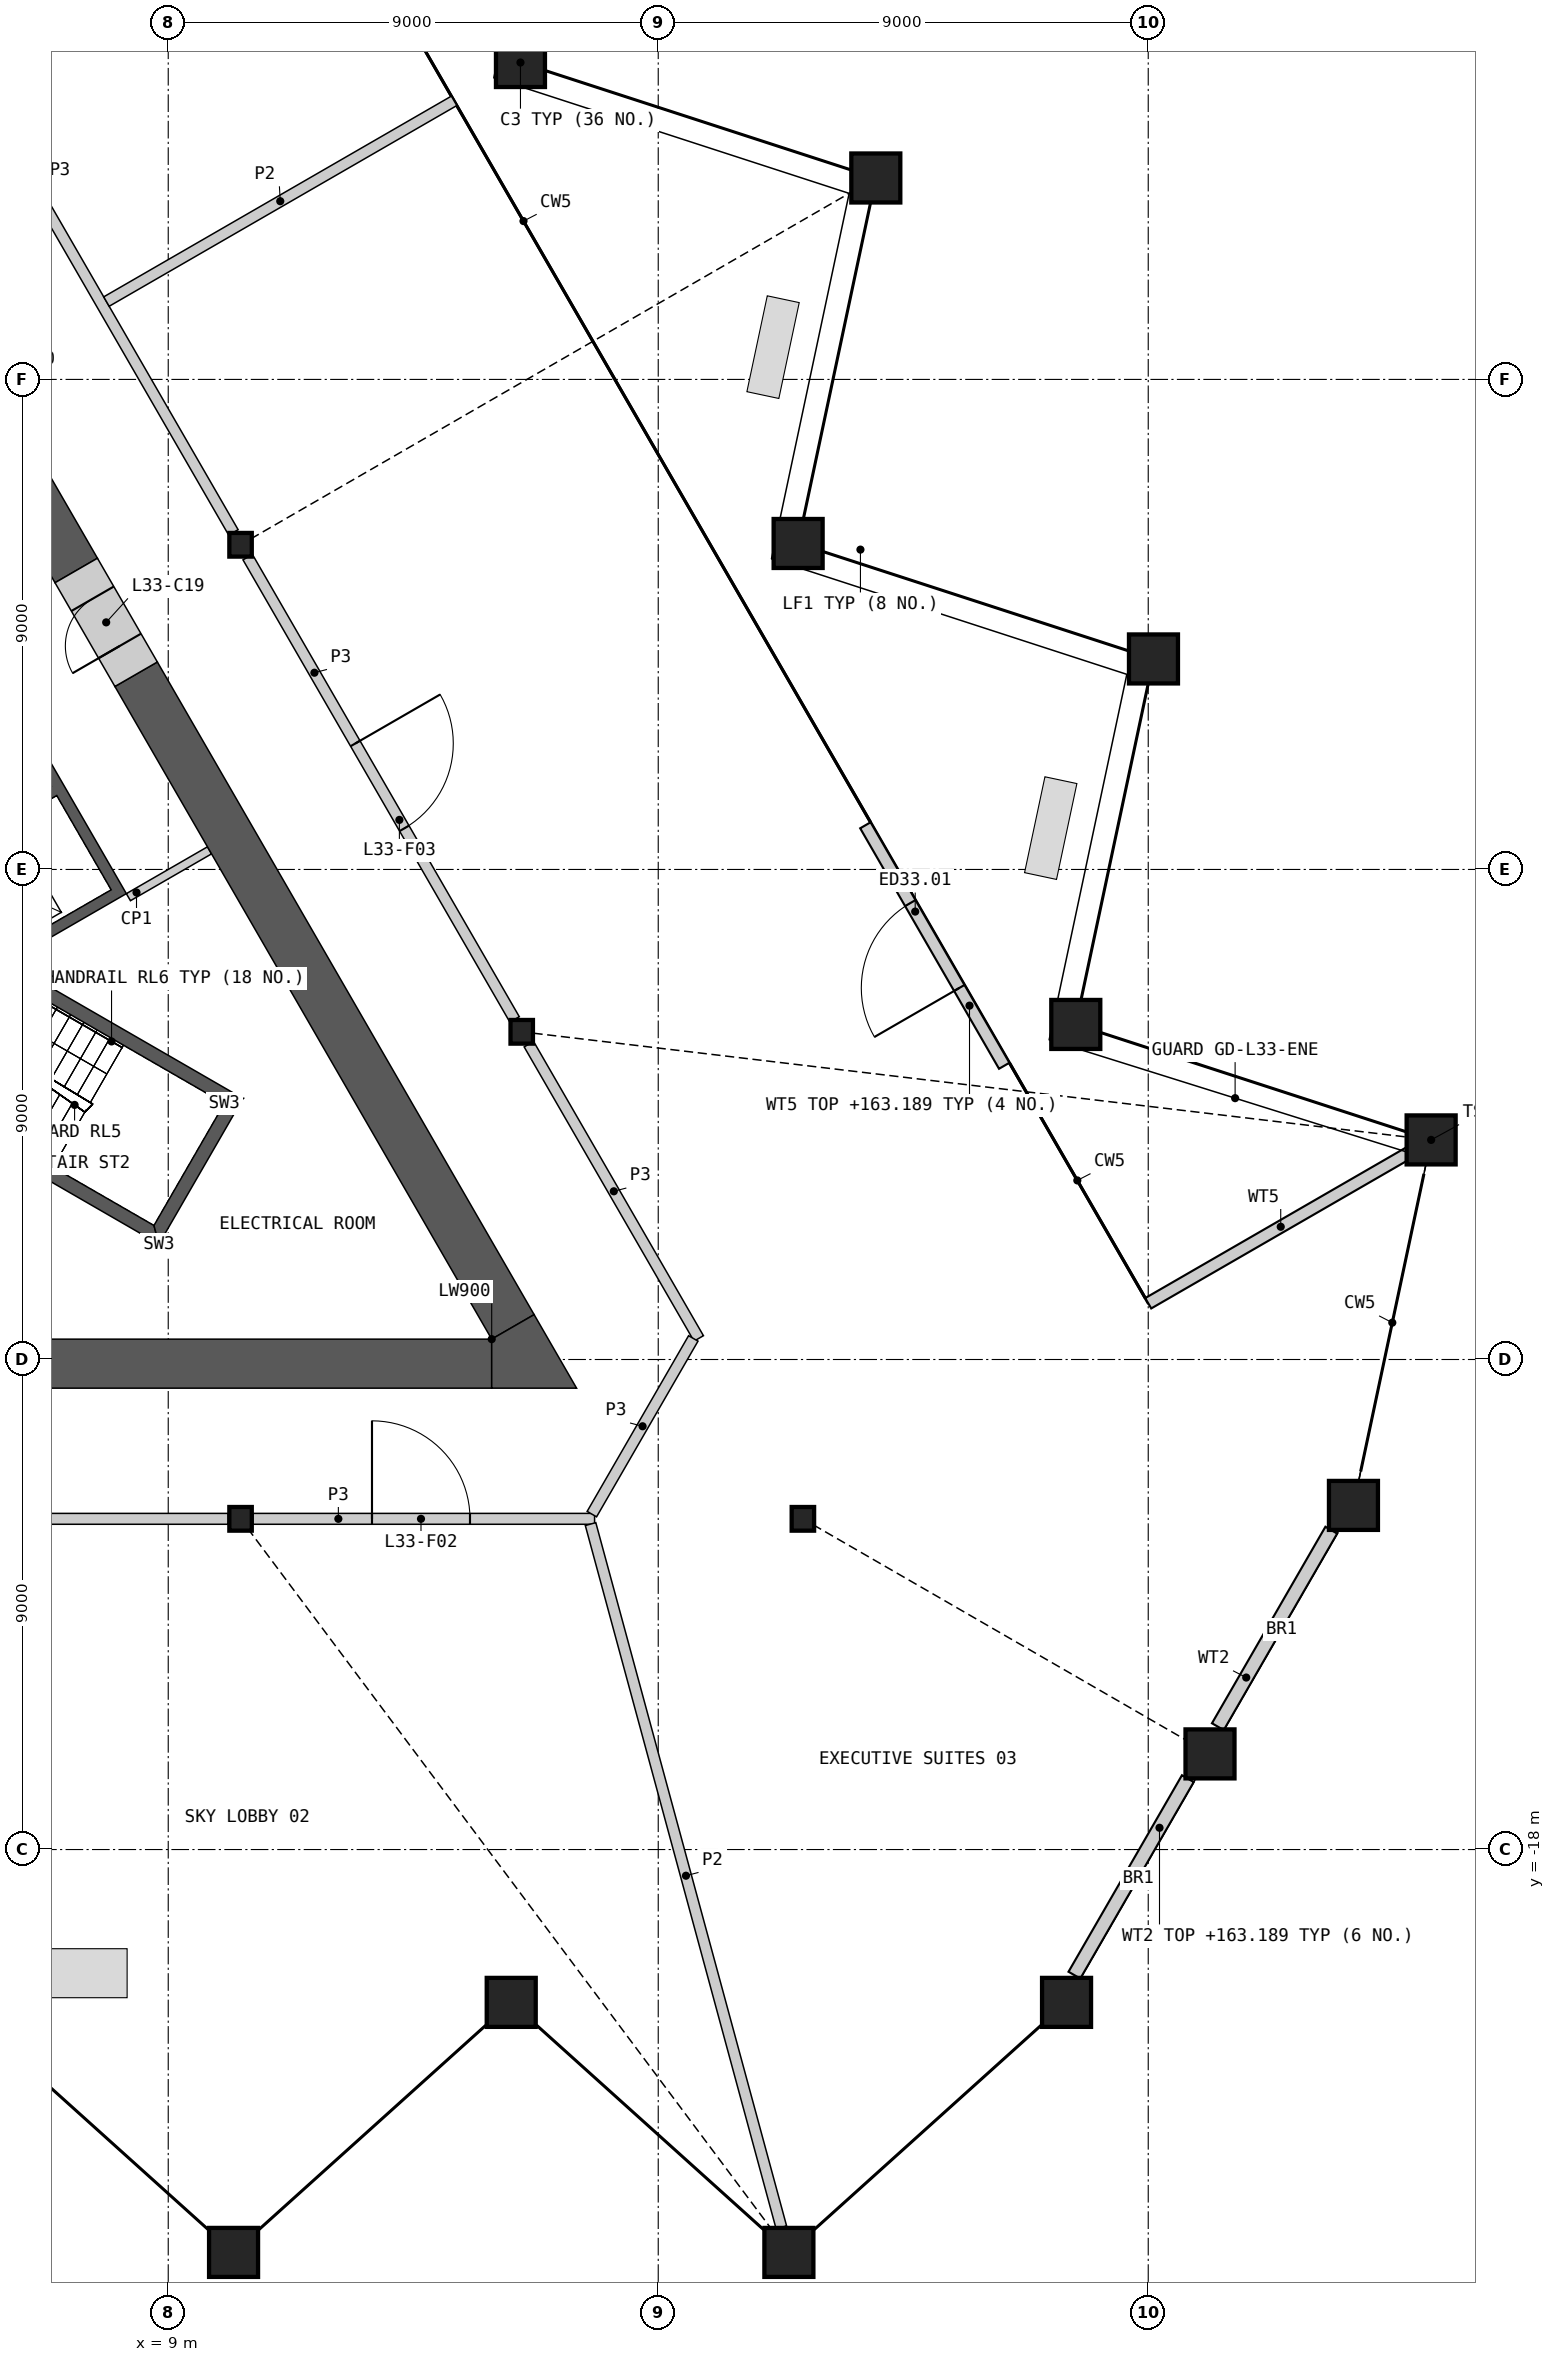
"""IFC4 building model, lengths in metres.
Left out: names, types, materials, properties, quantities, classifications, styles, units other than length and angle.
Written with IfcOpenShell. Run it as: python <this file> out.ifc"""

import sys

from ifc_helpers import new_model, si_unit, direction, frame, frame_2d, origin, origin_2d, place, context, subcontext, project, spatial, polyline, rectangle, hollow_rectangle, i_section, outline, extrude, element, fill, save


model = new_model("IFC4")
c1 = context("Model", 3, precision=1e-05, world=origin(), true_north=direction((0.0, 1.0)))
c2 = subcontext(c1, "Body", "Model", "MODEL_VIEW")
j1 = project(units=[si_unit("LENGTHUNIT", "METRE"), si_unit("PLANEANGLEUNIT", "RADIAN")], contexts=[c1])
p1 = place(None, origin())
s1 = spatial("IfcSite", under=j1, at=p1, CompositionType="ELEMENT")
p2 = place(p1, origin())
s2 = spatial("IfcBuilding", under=s1, at=p2, CompositionType="ELEMENT")
p3 = place(p2, frame((0.0, 0.0, 154.2)))
s3 = spatial("IfcBuildingStorey", under=s2, at=p3, CompositionType="ELEMENT", Elevation=154.2)
for number, where, z_axis, x_axis in (
    (1, (10.2, -25.399, 0.0), (0.0, 0.0, 1.0), (1.0, 0.0, 0.0)),
    (2, (15.3, -20.807, 0.0), (0.0, 0.0, 1.0), (1.0, 0.0, 0.0)),
    (3, (20.4, -25.399, 0.0), (0.0, 0.0, 1.0), (1.0, 0.0, 0.0)),
    (4, (25.5, -20.807, 0.0), (0.0, 0.0, 1.0), (1.0, 0.0, 0.0)),
    (5, (28.135, -16.243, 0.0), (0.0, 0.0, 1.0), (1.0, 0.0, 0.0)),
    (6, (30.769, -11.68, 0.0), (0.0, 0.0, 1.0), (1.0, 0.0, 0.0)),
    (7, (32.196, -4.967, 0.0), (0.0, 0.0, 1.0), (1.0, 0.0, 0.0)),
    (8, (25.669, -2.846, 0.0), (0.0, 0.0, 1.0), (1.0, 0.0, 0.0)),
    (9, (27.096, 3.866, 0.0), (0.0, 0.0, 1.0), (1.0, 0.0, 0.0)),
    (10, (20.57, 5.987, 0.0), (0.0, 0.0, 1.0), (1.0, 0.0, 0.0)),
    (11, (21.996, 12.699, 0.0), (0.0, 0.0, 1.0), (1.0, 0.0, 0.0)),
    (12, (15.469, 14.82, 0.0), (0.0, 0.0, 1.0), (1.0, 0.0, 0.0)),
):
    element("IfcColumn", number, at=place(p3, frame(where, z_axis=z_axis, x_axis=x_axis)), inside=s3, PredefinedType="COLUMN", context=c2, shape_type="SweptSolid", body=[
        extrude(hollow_rectangle(XDim=0.9, YDim=0.9, WallThickness=0.06, at=origin_2d()), origin(), (0.0, 0.0, 1.0), 10.0),
    ])
for number, where, z_axis, x_axis in (
    (13, (10.328, -11.926, 0.0), (0.0, 0.0, 1.0), (1.0, 0.0, 0.0)),
    (14, (20.657, -11.926, 0.0), (0.0, 0.0, 1.0), (1.0, 0.0, 0.0)),
    (15, (15.493, -2.982, 0.0), (0.0, 0.0, 1.0), (1.0, 0.0, 0.0)),
    (16, (10.328, 5.963, 0.0), (0.0, 0.0, 1.0), (1.0, 0.0, 0.0)),
):
    element("IfcColumn", number, at=place(p3, frame(where, z_axis=z_axis, x_axis=x_axis)), inside=s3, PredefinedType="COLUMN", context=c2, shape_type="SweptSolid", body=[
        extrude(i_section(OverallWidth=0.412, OverallDepth=0.435, WebThickness=0.036, FlangeThickness=0.057, at=origin_2d()), origin(), (0.0, 0.0, 1.0), 10.0),
    ])
for number, where, z_axis, x_axis in (
    (17, (25.644, -20.307, 0.0), (0.0, 0.0, 1.0), (0.5, 0.866, 0.0)),
    (18, (28.279, -15.743, 0.0), (0.0, 0.0, 1.0), (0.5, 0.866, 0.0)),
):
    element("IfcWall", number, at=place(p3, frame(where, z_axis=z_axis, x_axis=x_axis)), inside=s3, PredefinedType="SOLIDWALL", context=c2, shape_type="SweptSolid", body=[
        extrude(rectangle(XDim=4.167, YDim=0.25, at=frame_2d((2.084, 0.0))), origin(), (0.0, 0.0, 1.0), 8.989),
    ])
p4 = place(p3, frame((24.355, -3.605, 0.0), z_axis=(0.0, 0.0, 1.0), x_axis=(-0.499969707105, 0.866042892689, 0.0)))
e19 = element("IfcWall", 19, at=p4, inside=s3, PredefinedType="SOLIDWALL", context=c2, shape_type="SweptSolid", body=[
    extrude(rectangle(XDim=5.1, YDim=0.22, at=frame_2d((2.55, 0.0))), origin(), (0.0, 0.0, 1.0), 8.989),
])
p5 = place(p4, frame((1.65, 0.0, 0.0)))
e20 = element("IfcOpeningElement", 20, at=p5, cuts=e19, PredefinedType="OPENING", context=c2, shape_type="SweptSolid", body=[
    extrude(rectangle(XDim=1.8, YDim=2.4, at=frame_2d((0.9, 1.2))), frame((0.0, 0.12, 0.0), z_axis=(0.0, -1.0, 0.0), x_axis=(1.0, 0.0, 0.0)), (0.0, 0.0, 1.0), 0.24),
])
p6 = place(p3, frame((31.867, -5.157, 0.0), z_axis=(0.0, 0.0, 1.0), x_axis=(-0.866045247681, -0.499965627787, 0.0)))
e21 = element("IfcWall", 21, at=p6, inside=s3, PredefinedType="SOLIDWALL", context=c2, shape_type="SweptSolid", body=[
    extrude(rectangle(XDim=5.62, YDim=0.22, at=frame_2d((2.81, 0.0))), origin(), (0.0, 0.0, 1.0), 8.989),
])
p7 = place(p3, origin())
e22 = element("IfcWall", 22, at=p7, inside=s3, PredefinedType="SHEAR", context=c2, shape_type="SweptSolid", body=[
    extrude(outline(polyline([(1.561, 6.097), (3.731, 7.35), (8.231, -0.444), (6.061, -1.697), (5.96, -1.524), (7.952, -0.374), (6.952, 1.358), (4.96, 0.208), (4.861, 0.381), (6.852, 1.531), (5.852, 3.263), (3.861, 2.113), (3.76, 2.287), (5.752, 3.437), (4.752, 5.169), (2.76, 4.019), (2.66, 4.192), (4.652, 5.342), (3.652, 7.074), (1.66, 5.924), (1.561, 6.097)])), origin(), (0.0, 0.0, 1.0), 9.6),
])
p8 = place(p3, origin())
e23 = element("IfcWall", 23, at=p8, inside=s3, PredefinedType="SHEAR", context=c2, shape_type="SweptSolid", body=[
    extrude(outline(polyline([(3.763, -3.956), (8.83, -6.881), (8.738, -6.539), (3.888, -3.739), (3.763, -3.956)])), origin(), (0.0, 0.0, 1.0), 9.6),
])
p9 = place(p3, origin())
e24 = element("IfcWall", 24, at=p9, inside=s3, PredefinedType="SHEAR", context=c2, shape_type="SweptSolid", body=[
    extrude(outline(polyline([(8.83, -6.881), (10.374, -4.206), (10.032, -4.298), (8.738, -6.539), (8.83, -6.881)])), origin(), (0.0, 0.0, 1.0), 9.6),
])
p10 = place(p3, origin())
e25 = element("IfcWall", 25, at=p10, inside=s3, PredefinedType="SHEAR", context=c2, shape_type="SweptSolid", body=[
    extrude(outline(polyline([(10.032, -4.298), (10.374, -4.206), (5.307, -1.281), (5.182, -1.498), (10.032, -4.298)])), origin(), (0.0, 0.0, 1.0), 9.6),
])
p11 = place(p3, frame((8.268, -0.509, 0.0), z_axis=(0.0, 0.0, 1.0), x_axis=(0.866024871741, 0.500000921525, 0.0)))
e26 = element("IfcWall", 26, at=p11, inside=s3, PredefinedType="PARTITIONING", context=c2, shape_type="SweptSolid", body=[
    extrude(rectangle(XDim=1.72, YDim=0.15, at=frame_2d((0.86, 0.0))), origin(), (0.0, 0.0, 1.0), 9.6),
])
p12 = place(p3, frame((6.321, -9.076, 0.0), z_axis=(0.0, 0.0, 1.0), x_axis=(1.0, 0.0, 0.0)))
e27 = element("IfcWall", 27, at=p12, inside=s3, PredefinedType="SHEAR", context=c2, shape_type="SweptSolid", body=[
    extrude(rectangle(XDim=8.621, YDim=0.9, at=frame_2d((4.31, 0.0))), origin(), (0.0, 0.0, 1.0), 9.6),
])
p13 = place(p3, frame((15.331, -8.401, 0.0), z_axis=(0.0, 0.0, 1.0), x_axis=(-0.499990163897, 0.866031082587, 0.0)))
e28 = element("IfcWall", 28, at=p13, inside=s3, PredefinedType="SHEAR", context=c2, shape_type="SweptSolid", body=[
    extrude(rectangle(XDim=13.841, YDim=0.9, at=frame_2d((6.92, 0.0))), origin(), (0.0, 0.0, 1.0), 9.6),
])
p14 = place(p3, frame((7.31, 5.491, 0.0), z_axis=(0.0, 0.0, 1.0), x_axis=(-0.499996970966, 0.866027152591, 0.0)))
e29 = element("IfcWall", 29, at=p14, inside=s3, PredefinedType="SHEAR", context=c2, shape_type="SweptSolid", body=[
    extrude(rectangle(XDim=7.596, YDim=0.9, at=frame_2d((3.798, 0.0))), origin(), (0.0, 0.0, 1.0), 9.6),
])
p15 = place(p3, origin())
e30 = element("IfcWall", 30, at=p15, inside=s3, PredefinedType="SHEAR", context=c2, shape_type="SweptSolid", body=[
    extrude(outline(polyline([(14.941, -8.626), (15.721, -8.176), (16.5, -9.526), (14.941, -9.526), (14.941, -8.626)])), origin(), (0.0, 0.0, 1.0), 9.6),
])
p16 = place(p3, frame((8.41, 3.585, 0.0), z_axis=(0.0, 0.0, 1.0), x_axis=(-0.50002983664, 0.866008176907, 0.0)))
e31 = element("IfcWall", 31, at=p16, inside=s3, PredefinedType="SHEAR", context=c2, shape_type="SweptSolid", body=[
    extrude(rectangle(XDim=2.2, YDim=0.9, at=frame_2d((1.1, 0.0))), origin(), (0.0, 0.0, 1.0), 9.6),
])
p17 = place(p16, frame((0.6, 0.0, 0.0)))
e32 = element("IfcOpeningElement", 32, at=p17, cuts=e31, PredefinedType="OPENING", context=c2, shape_type="SweptSolid", body=[
    extrude(rectangle(XDim=1.0, YDim=2.1, at=frame_2d((0.5, 1.05))), frame((0.0, 0.46, 0.0), z_axis=(0.0, -1.0, 0.0), x_axis=(1.0, 0.0, 0.0)), (0.0, 0.0, 1.0), 0.92),
])
p18 = place(p3, frame((0.227, -11.926, 0.0), z_axis=(0.0, 0.0, 1.0), x_axis=(1.0, 0.0, 0.0)))
e33 = element("IfcWall", 33, at=p18, inside=s3, PredefinedType="PARTITIONING", context=c2, shape_type="SweptSolid", body=[
    extrude(rectangle(XDim=9.874, YDim=0.2, at=frame_2d((4.937, 0.0))), origin(), (0.0, 0.0, 1.0), 9.6),
])
p19 = place(p3, frame((10.46, 5.736, 0.0), z_axis=(0.0, 0.0, 1.0), x_axis=(0.500004141693, -0.866023012564, 0.0)))
e34 = element("IfcWall", 34, at=p19, inside=s3, PredefinedType="PARTITIONING", context=c2, shape_type="SweptSolid", body=[
    extrude(rectangle(XDim=9.803, YDim=0.2, at=frame_2d((4.902, 0.0))), origin(), (0.0, 0.0, 1.0), 9.6),
])
p20 = place(p19, frame((3.952, 0.0, 0.0)))
e35 = element("IfcOpeningElement", 35, at=p20, cuts=e34, PredefinedType="OPENING", context=c2, shape_type="SweptSolid", body=[
    extrude(rectangle(XDim=1.8, YDim=2.1, at=frame_2d((0.9, 1.05))), frame((0.0, 0.11, 0.0), z_axis=(0.0, -1.0, 0.0), x_axis=(1.0, 0.0, 0.0)), (0.0, 0.0, 1.0), 0.22),
])
p21 = place(p3, frame((5.295, 14.68, 0.0), z_axis=(0.0, 0.0, 1.0), x_axis=(0.500012035596, -0.866018454918, 0.0)))
e36 = element("IfcWall", 36, at=p21, inside=s3, PredefinedType="PARTITIONING", context=c2, shape_type="SweptSolid", body=[
    extrude(rectangle(XDim=9.803, YDim=0.2, at=frame_2d((4.902, 0.0))), origin(), (0.0, 0.0, 1.0), 9.6),
])
p22 = place(p3, frame((10.556, -11.926, 0.0), z_axis=(0.0, 0.0, 1.0), x_axis=(1.0, 0.0, 0.0)))
e37 = element("IfcWall", 37, at=p22, inside=s3, PredefinedType="PARTITIONING", context=c2, shape_type="SweptSolid", body=[
    extrude(rectangle(XDim=6.275, YDim=0.2, at=frame_2d((3.137, 0.0))), origin(), (0.0, 0.0, 1.0), 9.6),
])
p23 = place(p22, frame((2.187, 0.0, 0.0)))
e38 = element("IfcOpeningElement", 38, at=p23, cuts=e37, PredefinedType="OPENING", context=c2, shape_type="SweptSolid", body=[
    extrude(rectangle(XDim=1.8, YDim=2.1, at=frame_2d((0.9, 1.05))), frame((0.0, 0.11, 0.0), z_axis=(0.0, -1.0, 0.0), x_axis=(1.0, 0.0, 0.0)), (0.0, 0.0, 1.0), 0.22),
])
p24 = place(p3, frame((15.624, -3.209, 0.0), z_axis=(0.0, 0.0, 1.0), x_axis=(0.499997920671, -0.866026604282, 0.0)))
e39 = element("IfcWall", 39, at=p24, inside=s3, PredefinedType="PARTITIONING", context=c2, shape_type="SweptSolid", body=[
    extrude(rectangle(XDim=6.24, YDim=0.2, at=frame_2d((3.12, 0.0))), origin(), (0.0, 0.0, 1.0), 9.6),
])
p25 = place(p3, frame((16.781, -11.84, 0.0), z_axis=(0.0, 0.0, 1.0), x_axis=(0.499958791762, 0.866049194065, 0.0)))
e40 = element("IfcWall", 40, at=p25, inside=s3, PredefinedType="PARTITIONING", context=c2, shape_type="SweptSolid", body=[
    extrude(rectangle(XDim=3.726, YDim=0.2, at=frame_2d((1.863, 0.0))), origin(), (0.0, 0.0, 1.0), 9.6),
])
p26 = place(p3, frame((16.757, -12.023, 0.0), z_axis=(0.0, 0.0, 1.0), x_axis=(0.261845290604, -0.965109860994, 0.0)))
e41 = element("IfcWall", 41, at=p26, inside=s3, PredefinedType="PARTITIONING", context=c2, shape_type="SweptSolid", body=[
    extrude(rectangle(XDim=13.384, YDim=0.2, at=frame_2d((6.692, 0.0))), origin(), (0.0, 0.0, 1.0), 8.685),
])
p27 = place(p3, frame((7.865, 10.43, 0.0), z_axis=(0.0, 0.0, 1.0), x_axis=(0.866025675355, 0.499999529627, 0.0)))
e42 = element("IfcWall", 42, at=p27, inside=s3, PredefinedType="PARTITIONING", context=c2, shape_type="SweptSolid", body=[
    extrude(rectangle(XDim=7.373, YDim=0.2, at=frame_2d((3.687, 0.0))), origin(), (0.0, 0.0, 1.0), 8.685),
])
p28 = place(p5, origin())
e43 = element("IfcDoor", 43, at=p28, inside=s3, OperationType="DOUBLE_DOOR_SINGLE_SWING", PredefinedType="DOOR", context=c2, shape_type="SweptSolid", body=[
    extrude(rectangle(XDim=1.8, YDim=2.4, at=frame_2d((0.9, 1.2))), frame((0.0, 0.025, 0.0), z_axis=(0.0, -1.0, 0.0), x_axis=(1.0, 0.0, 0.0)), (0.0, 0.0, 1.0), 0.05),
])
fill(e20, e43)
p29 = place(p17, origin())
e44 = element("IfcDoor", 44, at=p29, inside=s3, OperationType="SINGLE_SWING_LEFT", PredefinedType="DOOR", context=c2, shape_type="SweptSolid", body=[
    extrude(rectangle(XDim=1.0, YDim=2.1, at=frame_2d((0.5, 1.05))), frame((0.0, 0.205, 0.0), z_axis=(0.0, -1.0, 0.0), x_axis=(1.0, 0.0, 0.0)), (0.0, 0.0, 1.0), 0.05),
])
fill(e32, e44)
p30 = place(p23, origin())
e45 = element("IfcDoor", 45, at=p30, inside=s3, OperationType="DOUBLE_DOOR_SINGLE_SWING", PredefinedType="DOOR", context=c2, shape_type="SweptSolid", body=[
    extrude(rectangle(XDim=1.8, YDim=2.1, at=frame_2d((0.9, 1.05))), frame((0.0, 0.025, 0.0), z_axis=(0.0, -1.0, 0.0), x_axis=(1.0, 0.0, 0.0)), (0.0, 0.0, 1.0), 0.05),
])
fill(e38, e45)
p31 = place(p20, origin())
e46 = element("IfcDoor", 46, at=p31, inside=s3, OperationType="DOUBLE_DOOR_SINGLE_SWING", PredefinedType="DOOR", context=c2, shape_type="SweptSolid", body=[
    extrude(rectangle(XDim=1.8, YDim=2.1, at=frame_2d((0.9, 1.05))), frame((0.0, 0.025, 0.0), z_axis=(0.0, -1.0, 0.0), x_axis=(1.0, 0.0, 0.0)), (0.0, 0.0, 1.0), 0.05),
])
fill(e35, e46)
save(model, sys.argv[1])
